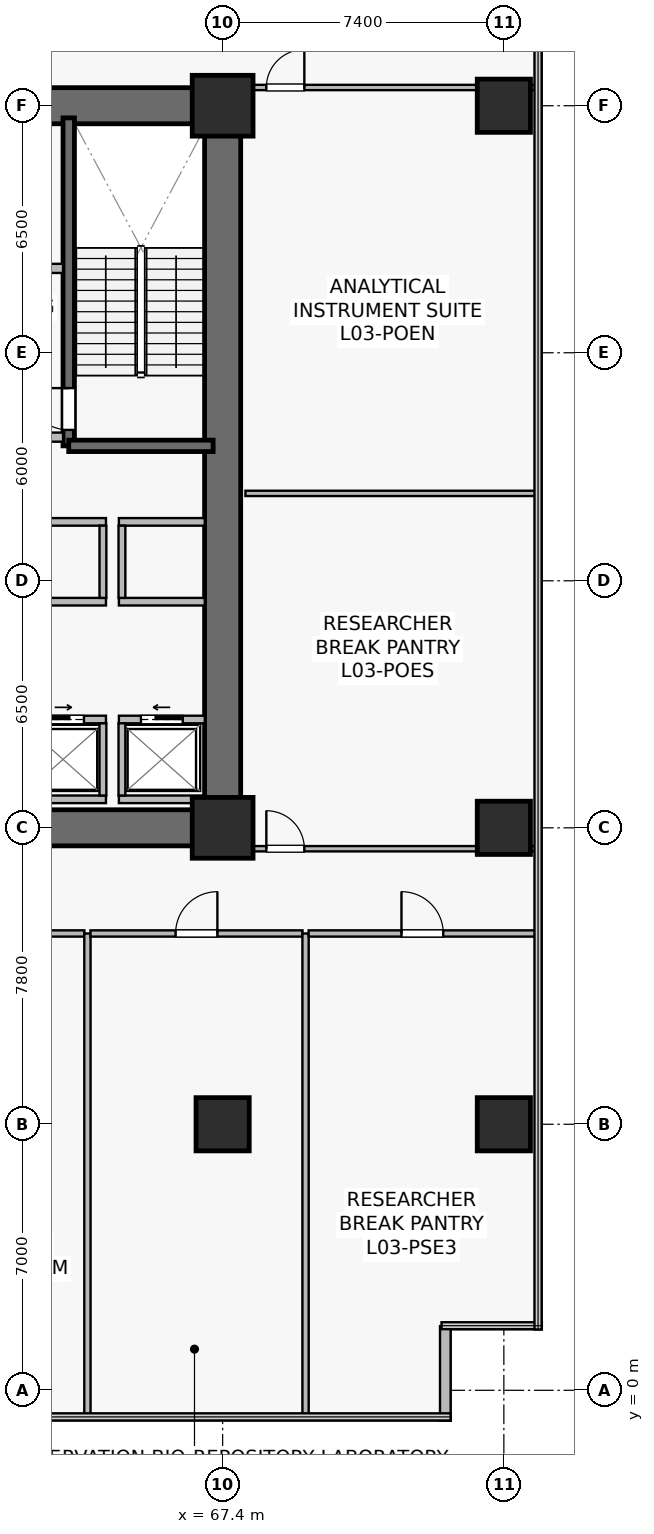
"""IFC4 building model, lengths in metres.
Left out: names, types, materials, properties, quantities, classifications, styles, units other than length and angle.
Written with IfcOpenShell. Run it as: python <this file> out.ifc"""

import sys

from ifc_helpers import new_model, si_unit, direction, frame, frame_2d, origin, origin_2d, place, context, subcontext, project, spatial, rectangle, extrude, source, transform, mapped, element, fill, save


model = new_model("IFC4")
c1 = context("Model", 3, precision=1e-05, world=origin(), true_north=direction((0.0, 1.0)))
c2 = subcontext(c1, "Body", "Model", "MODEL_VIEW")
j1 = project(units=[si_unit("LENGTHUNIT", "METRE"), si_unit("PLANEANGLEUNIT", "RADIAN")], contexts=[c1])
p1 = place(None, origin())
s1 = spatial("IfcSite", under=j1, at=p1, CompositionType="ELEMENT")
p2 = place(p1, origin())
s2 = spatial("IfcBuilding", under=s1, at=p2, CompositionType="ELEMENT")
p3 = place(p2, frame((0.0, 0.0, 10.2)))
s3 = spatial("IfcBuildingStorey", under=s2, at=p3, CompositionType="ELEMENT", Elevation=10.2)
p4 = place(p3, frame((52.125, 14.8, 0.0), z_axis=(0.0, 0.0, 1.0), x_axis=(1.0, 0.0, 0.0)))
e1 = element("IfcWall", 1, at=p4, inside=s3, PredefinedType="SHEAR", context=c2, shape_type="SweptSolid", body=[
    extrude(rectangle(XDim=15.75, YDim=0.95, at=frame_2d((7.875, 0.0))), origin(), (0.0, 0.0, 1.0), 4.45),
])
p5 = place(p3, frame((52.125, 33.8, 0.0), z_axis=(0.0, 0.0, 1.0), x_axis=(1.0, 0.0, 0.0)))
e2 = element("IfcWall", 2, at=p5, inside=s3, PredefinedType="SHEAR", context=c2, shape_type="SweptSolid", body=[
    extrude(rectangle(XDim=15.75, YDim=0.95, at=frame_2d((7.875, 0.0))), origin(), (0.0, 0.0, 1.0), 4.45),
])
p6 = place(p5, frame((8.975, 0.0, 0.0)))
e3 = element("IfcOpeningElement", 3, at=p6, cuts=e2, PredefinedType="OPENING", context=c2, shape_type="SweptSolid", body=[
    extrude(rectangle(XDim=0.95, YDim=2.15, at=frame_2d((0.475, 1.075))), frame((0.0, 0.485, 0.0), z_axis=(0.0, -1.0, 0.0), x_axis=(1.0, 0.0, 0.0)), (0.0, 0.0, 1.0), 0.97),
])
p7 = place(p5, frame((5.61, 0.0, 0.0)))
e4 = element("IfcOpeningElement", 4, at=p7, cuts=e2, PredefinedType="OPENING", context=c2, shape_type="SweptSolid", body=[
    extrude(rectangle(XDim=0.95, YDim=2.15, at=frame_2d((0.475, 1.075))), frame((0.0, 0.485, 0.0), z_axis=(0.0, -1.0, 0.0), x_axis=(1.0, 0.0, 0.0)), (0.0, 0.0, 1.0), 0.97),
])
p8 = place(p5, frame((2.21, 0.0, 0.0)))
e5 = element("IfcOpeningElement", 5, at=p8, cuts=e2, PredefinedType="OPENING", context=c2, shape_type="SweptSolid", body=[
    extrude(rectangle(XDim=0.95, YDim=2.15, at=frame_2d((0.475, 1.075))), frame((0.0, 0.485, 0.0), z_axis=(0.0, -1.0, 0.0), x_axis=(1.0, 0.0, 0.0)), (0.0, 0.0, 1.0), 0.97),
])
p9 = place(p3, frame((67.4, 15.275, 0.0), z_axis=(0.0, 0.0, 1.0), x_axis=(0.0, 1.0, 0.0)))
e6 = element("IfcWall", 6, at=p9, inside=s3, PredefinedType="SHEAR", context=c2, shape_type="SweptSolid", body=[
    extrude(rectangle(XDim=18.05, YDim=0.95, at=frame_2d((9.025, 0.0))), origin(), (0.0, 0.0, 1.0), 4.45),
])
p10 = place(p3, frame((63.35, 24.85, 0.0), z_axis=(0.0, 0.0, 1.0), x_axis=(0.0, 1.0, 0.0)))
e7 = element("IfcWall", 7, at=p10, inside=s3, PredefinedType="SHEAR", context=c2, shape_type="SweptSolid", body=[
    extrude(rectangle(XDim=8.63, YDim=0.3, at=frame_2d((4.315, 0.0))), origin(), (0.0, 0.0, 1.0), 4.45),
])
p11 = place(p10, frame((0.42, 0.0, 0.0)))
e8 = element("IfcOpeningElement", 8, at=p11, cuts=e7, PredefinedType="OPENING", context=c2, shape_type="SweptSolid", body=[
    extrude(rectangle(XDim=1.1, YDim=2.15, at=frame_2d((0.55, 1.075))), frame((0.0, 0.16, 0.0), z_axis=(0.0, -1.0, 0.0), x_axis=(1.0, 0.0, 0.0)), (0.0, 0.0, 1.0), 0.32),
])
p12 = place(p3, frame((63.35, 24.85, 0.0), z_axis=(0.0, 0.0, 1.0), x_axis=(1.0, 0.0, 0.0)))
e9 = element("IfcWall", 9, at=p12, inside=s3, PredefinedType="SHEAR", context=c2, shape_type="SweptSolid", body=[
    extrude(rectangle(XDim=3.8, YDim=0.3, at=frame_2d((1.9, 0.0))), origin(), (0.0, 0.0, 1.0), 4.45),
])
m1 = source(origin(), c2, "Body", "SweptSolid", [
    extrude(rectangle(XDim=1.6, YDim=1.6, at=origin_2d()), origin(), (0.0, 0.0, 1.0), 4.8),
])
for number, where, z_axis, x_axis in (
    (10, (67.4, 14.8, 0.0), (0.0, 0.0, 1.0), (1.0, 0.0, 0.0)),
    (11, (67.4, 33.8, 0.0), (0.0, 0.0, 1.0), (1.0, 0.0, 0.0)),
):
    element("IfcColumn", number, at=place(p3, frame(where, z_axis=z_axis, x_axis=x_axis)), inside=s3, PredefinedType="COLUMN", context=c2, shape_type="MappedRepresentation", body=[
        mapped(m1, transform((0.0, 0.0, 0.0), scale=1.0)),
    ])
m2 = source(origin(), c2, "Body", "SweptSolid", [
    extrude(rectangle(XDim=1.4, YDim=1.4, at=origin_2d()), origin(), (0.0, 0.0, 1.0), 4.8),
])
for number, where, z_axis, x_axis in (
    (12, (67.4, 7.0, 0.0), (0.0, 0.0, 1.0), (1.0, 0.0, 0.0)),
    (13, (74.8, 7.0, 0.0), (0.0, 0.0, 1.0), (1.0, 0.0, 0.0)),
    (14, (74.8, 14.8, 0.0), (0.0, 0.0, 1.0), (1.0, 0.0, 0.0)),
    (15, (74.8, 33.8, 0.0), (0.0, 0.0, 1.0), (1.0, 0.0, 0.0)),
):
    element("IfcColumn", number, at=place(p3, frame(where, z_axis=z_axis, x_axis=x_axis)), inside=s3, PredefinedType="COLUMN", context=c2, shape_type="MappedRepresentation", body=[
        mapped(m2, transform((0.0, 0.0, 0.0), scale=1.0)),
    ])
p13 = place(p3, frame((73.26, -0.8, 0.0), z_axis=(0.0, 0.0, 1.0), x_axis=(0.0, 1.0, 0.0)))
e16 = element("IfcWall", 16, at=p13, inside=s3, PredefinedType="STANDARD", context=c2, shape_type="SweptSolid", body=[
    extrude(rectangle(XDim=2.488, YDim=0.28, at=frame_2d((1.244, 0.0))), origin(), (0.0, 0.0, 1.0), 4.45),
])
p14 = place(p3, frame((56.28, 25.08, 0.0), z_axis=(0.0, 0.0, 1.0), x_axis=(1.0, 0.0, 0.0)))
e17 = element("IfcWall", 17, at=p14, inside=s3, PredefinedType="SOLIDWALL", context=c2, shape_type="SweptSolid", body=[
    extrude(rectangle(XDim=6.92, YDim=0.24, at=frame_2d((3.46, 0.0))), origin(), (0.0, 0.0, 1.0), 3.735),
])
p15 = place(p14, frame((2.6, 0.0, 0.0)))
e18 = element("IfcOpeningElement", 18, at=p15, cuts=e17, PredefinedType="OPENING", context=c2, shape_type="SweptSolid", body=[
    extrude(rectangle(XDim=1.2, YDim=2.16, at=frame_2d((0.6, 1.08))), frame((0.0, 0.13, 0.0), z_axis=(0.0, -1.0, 0.0), x_axis=(1.0, 0.0, 0.0)), (0.0, 0.0, 1.0), 0.26),
])
p16 = place(p3, frame((56.28, 29.52, 0.0), z_axis=(0.0, 0.0, 1.0), x_axis=(1.0, 0.0, 0.0)))
e19 = element("IfcWall", 19, at=p16, inside=s3, PredefinedType="SOLIDWALL", context=c2, shape_type="SweptSolid", body=[
    extrude(rectangle(XDim=6.92, YDim=0.24, at=frame_2d((3.46, 0.0))), origin(), (0.0, 0.0, 1.0), 3.735),
])
p17 = place(p3, frame((64.67, 17.65, 0.0), z_axis=(0.0, 0.0, 1.0), x_axis=(1.0, 0.0, 0.0)))
e20 = element("IfcWall", 20, at=p17, inside=s3, PredefinedType="SOLIDWALL", context=c2, shape_type="SweptSolid", body=[
    extrude(rectangle(XDim=2.26, YDim=0.2, at=frame_2d((1.13, 0.0))), origin(), (0.0, 0.0, 1.0), 4.45),
])
p18 = place(p17, frame((0.58, 0.0, 0.0)))
e21 = element("IfcOpeningElement", 21, at=p18, cuts=e20, PredefinedType="OPENING", context=c2, shape_type="SweptSolid", body=[
    extrude(rectangle(XDim=1.1, YDim=2.22, at=frame_2d((0.55, 1.11))), frame((0.0, 0.11, 0.0), z_axis=(0.0, -1.0, 0.0), x_axis=(1.0, 0.0, 0.0)), (0.0, 0.0, 1.0), 0.22),
])
p19 = place(p3, frame((64.67, 15.55, 0.0), z_axis=(0.0, 0.0, 1.0), x_axis=(1.0, 0.0, 0.0)))
e22 = element("IfcWall", 22, at=p19, inside=s3, PredefinedType="SOLIDWALL", context=c2, shape_type="SweptSolid", body=[
    extrude(rectangle(XDim=2.26, YDim=0.2, at=frame_2d((1.13, 0.0))), origin(), (0.0, 0.0, 1.0), 4.45),
])
p20 = place(p3, frame((64.75, 15.65, 0.0), z_axis=(0.0, 0.0, 1.0), x_axis=(0.0, 1.0, 0.0)))
e23 = element("IfcWall", 23, at=p20, inside=s3, PredefinedType="SOLIDWALL", context=c2, shape_type="SweptSolid", body=[
    extrude(rectangle(XDim=1.9, YDim=0.18, at=frame_2d((0.95, 0.0))), origin(), (0.0, 0.0, 1.0), 4.45),
])
p21 = place(p3, frame((62.07, 17.65, 0.0), z_axis=(0.0, 0.0, 1.0), x_axis=(1.0, 0.0, 0.0)))
e24 = element("IfcWall", 24, at=p21, inside=s3, PredefinedType="SOLIDWALL", context=c2, shape_type="SweptSolid", body=[
    extrude(rectangle(XDim=2.26, YDim=0.2, at=frame_2d((1.13, 0.0))), origin(), (0.0, 0.0, 1.0), 4.45),
])
p22 = place(p21, frame((0.58, 0.0, 0.0)))
e25 = element("IfcOpeningElement", 25, at=p22, cuts=e24, PredefinedType="OPENING", context=c2, shape_type="SweptSolid", body=[
    extrude(rectangle(XDim=1.1, YDim=2.22, at=frame_2d((0.55, 1.11))), frame((0.0, 0.11, 0.0), z_axis=(0.0, -1.0, 0.0), x_axis=(1.0, 0.0, 0.0)), (0.0, 0.0, 1.0), 0.22),
])
p23 = place(p3, frame((62.07, 15.55, 0.0), z_axis=(0.0, 0.0, 1.0), x_axis=(1.0, 0.0, 0.0)))
e26 = element("IfcWall", 26, at=p23, inside=s3, PredefinedType="SOLIDWALL", context=c2, shape_type="SweptSolid", body=[
    extrude(rectangle(XDim=2.26, YDim=0.2, at=frame_2d((1.13, 0.0))), origin(), (0.0, 0.0, 1.0), 4.45),
])
p24 = place(p3, frame((64.25, 15.65, 0.0), z_axis=(0.0, 0.0, 1.0), x_axis=(0.0, 1.0, 0.0)))
e27 = element("IfcWall", 27, at=p24, inside=s3, PredefinedType="SOLIDWALL", context=c2, shape_type="SweptSolid", body=[
    extrude(rectangle(XDim=1.9, YDim=0.18, at=frame_2d((0.95, 0.0))), origin(), (0.0, 0.0, 1.0), 4.45),
])
for number, where, z_axis, x_axis in (
    (28, (64.67, 20.75, 0.0), (0.0, 0.0, 1.0), (1.0, 0.0, 0.0)),
    (29, (64.67, 22.85, 0.0), (0.0, 0.0, 1.0), (1.0, 0.0, 0.0)),
):
    element("IfcWall", number, at=place(p3, frame(where, z_axis=z_axis, x_axis=x_axis)), inside=s3, PredefinedType="SOLIDWALL", context=c2, shape_type="SweptSolid", body=[
        extrude(rectangle(XDim=2.26, YDim=0.2, at=frame_2d((1.13, 0.0))), origin(), (0.0, 0.0, 1.0), 4.45),
    ])
p25 = place(p3, frame((64.75, 20.85, 0.0), z_axis=(0.0, 0.0, 1.0), x_axis=(0.0, 1.0, 0.0)))
e30 = element("IfcWall", 30, at=p25, inside=s3, PredefinedType="SOLIDWALL", context=c2, shape_type="SweptSolid", body=[
    extrude(rectangle(XDim=1.9, YDim=0.18, at=frame_2d((0.95, 0.0))), origin(), (0.0, 0.0, 1.0), 4.45),
])
for number, where, z_axis, x_axis in (
    (31, (62.07, 20.75, 0.0), (0.0, 0.0, 1.0), (1.0, 0.0, 0.0)),
    (32, (62.07, 22.85, 0.0), (0.0, 0.0, 1.0), (1.0, 0.0, 0.0)),
):
    element("IfcWall", number, at=place(p3, frame(where, z_axis=z_axis, x_axis=x_axis)), inside=s3, PredefinedType="SOLIDWALL", context=c2, shape_type="SweptSolid", body=[
        extrude(rectangle(XDim=2.26, YDim=0.2, at=frame_2d((1.13, 0.0))), origin(), (0.0, 0.0, 1.0), 4.45),
    ])
p26 = place(p3, frame((64.25, 20.85, 0.0), z_axis=(0.0, 0.0, 1.0), x_axis=(0.0, 1.0, 0.0)))
e33 = element("IfcWall", 33, at=p26, inside=s3, PredefinedType="SOLIDWALL", context=c2, shape_type="SweptSolid", body=[
    extrude(rectangle(XDim=1.9, YDim=0.18, at=frame_2d((0.95, 0.0))), origin(), (0.0, 0.0, 1.0), 4.45),
])
p27 = place(p3, frame((68.0, 23.6, 0.0), z_axis=(0.0, 0.0, 1.0), x_axis=(1.0, 0.0, 0.0)))
e34 = element("IfcWall", 34, at=p27, inside=s3, PredefinedType="PARTITIONING", context=c2, shape_type="SweptSolid", body=[
    extrude(rectangle(XDim=7.65, YDim=0.14, at=frame_2d((3.825, 0.0))), origin(), (0.0, 0.0, 1.0), 3.835),
])
p28 = place(p3, frame((68.0, 14.25, 0.0), z_axis=(0.0, 0.0, 1.0), x_axis=(1.0, 0.0, 0.0)))
e35 = element("IfcWall", 35, at=p28, inside=s3, PredefinedType="PARTITIONING", context=c2, shape_type="SweptSolid", body=[
    extrude(rectangle(XDim=7.65, YDim=0.14, at=frame_2d((3.825, 0.0))), origin(), (0.0, 0.0, 1.0), 3.835),
])
p29 = place(p28, frame((0.55, 0.0, 0.0)))
e36 = element("IfcOpeningElement", 36, at=p29, cuts=e35, PredefinedType="OPENING", context=c2, shape_type="SweptSolid", body=[
    extrude(rectangle(XDim=1.0, YDim=2.15, at=frame_2d((0.5, 1.075))), frame((0.0, 0.08, 0.0), z_axis=(0.0, -1.0, 0.0), x_axis=(1.0, 0.0, 0.0)), (0.0, 0.0, 1.0), 0.16),
])
p30 = place(p3, frame((68.0, 34.28, 0.0), z_axis=(0.0, 0.0, 1.0), x_axis=(1.0, 0.0, 0.0)))
e37 = element("IfcWall", 37, at=p30, inside=s3, PredefinedType="PARTITIONING", context=c2, shape_type="SweptSolid", body=[
    extrude(rectangle(XDim=7.65, YDim=0.14, at=frame_2d((3.825, 0.0))), origin(), (0.0, 0.0, 1.0), 3.835),
])
p31 = place(p30, frame((0.55, 0.0, 0.0)))
e38 = element("IfcOpeningElement", 38, at=p31, cuts=e37, PredefinedType="OPENING", context=c2, shape_type="SweptSolid", body=[
    extrude(rectangle(XDim=1.0, YDim=2.15, at=frame_2d((0.5, 1.075))), frame((0.0, 0.08, 0.0), z_axis=(0.0, -1.0, 0.0), x_axis=(1.0, 0.0, 0.0)), (0.0, 0.0, 1.0), 0.16),
])
p32 = place(p3, frame((59.25, 12.02, 0.0), z_axis=(0.0, 0.0, 1.0), x_axis=(1.0, 0.0, 0.0)))
e39 = element("IfcWall", 39, at=p32, inside=s3, PredefinedType="PARTITIONING", context=c2, shape_type="SweptSolid", body=[
    extrude(rectangle(XDim=4.512, YDim=0.165, at=frame_2d((2.256, 0.0))), origin(), (0.0, 0.0, 1.0), 3.735),
])
p33 = place(p32, frame((1.706, 0.0, 0.0)))
e40 = element("IfcOpeningElement", 40, at=p33, cuts=e39, PredefinedType="OPENING", context=c2, shape_type="SweptSolid", body=[
    extrude(rectangle(XDim=1.1, YDim=2.18, at=frame_2d((0.55, 1.09))), frame((0.0, 0.093, 0.0), z_axis=(0.0, -1.0, 0.0), x_axis=(1.0, 0.0, 0.0)), (0.0, 0.0, 1.0), 0.185),
])
p34 = place(p3, frame((63.842, -0.69, 0.0), z_axis=(0.0, 0.0, 1.0), x_axis=(0.0, 1.0, 0.0)))
e41 = element("IfcWall", 41, at=p34, inside=s3, PredefinedType="PARTITIONING", context=c2, shape_type="SweptSolid", body=[
    extrude(rectangle(XDim=12.71, YDim=0.165, at=frame_2d((6.355, 0.0))), origin(), (0.0, 0.0, 1.0), 3.635),
])
p35 = place(p3, frame((63.922, 12.02, 0.0), z_axis=(0.0, 0.0, 1.0), x_axis=(1.0, 0.0, 0.0)))
e42 = element("IfcWall", 42, at=p35, inside=s3, PredefinedType="PARTITIONING", context=c2, shape_type="SweptSolid", body=[
    extrude(rectangle(XDim=5.58, YDim=0.165, at=frame_2d((2.79, 0.0))), origin(), (0.0, 0.0, 1.0), 3.735),
])
p36 = place(p35, frame((2.24, 0.0, 0.0)))
e43 = element("IfcOpeningElement", 43, at=p36, cuts=e42, PredefinedType="OPENING", context=c2, shape_type="SweptSolid", body=[
    extrude(rectangle(XDim=1.1, YDim=2.18, at=frame_2d((0.55, 1.09))), frame((0.0, 0.093, 0.0), z_axis=(0.0, -1.0, 0.0), x_axis=(1.0, 0.0, 0.0)), (0.0, 0.0, 1.0), 0.185),
])
p37 = place(p3, frame((69.582, -0.69, 0.0), z_axis=(0.0, 0.0, 1.0), x_axis=(0.0, 1.0, 0.0)))
e44 = element("IfcWall", 44, at=p37, inside=s3, PredefinedType="PARTITIONING", context=c2, shape_type="SweptSolid", body=[
    extrude(rectangle(XDim=12.71, YDim=0.165, at=frame_2d((6.355, 0.0))), origin(), (0.0, 0.0, 1.0), 3.635),
])
p38 = place(p3, frame((69.662, 12.02, 0.0), z_axis=(0.0, 0.0, 1.0), x_axis=(1.0, 0.0, 0.0)))
e45 = element("IfcWall", 45, at=p38, inside=s3, PredefinedType="PARTITIONING", context=c2, shape_type="SweptSolid", body=[
    extrude(rectangle(XDim=5.988, YDim=0.165, at=frame_2d((2.994, 0.0))), origin(), (0.0, 0.0, 1.0), 3.835),
])
p39 = place(p38, frame((2.444, 0.0, 0.0)))
e46 = element("IfcOpeningElement", 46, at=p39, cuts=e45, PredefinedType="OPENING", context=c2, shape_type="SweptSolid", body=[
    extrude(rectangle(XDim=1.1, YDim=2.18, at=frame_2d((0.55, 1.09))), frame((0.0, 0.093, 0.0), z_axis=(0.0, -1.0, 0.0), x_axis=(1.0, 0.0, 0.0)), (0.0, 0.0, 1.0), 0.185),
])
m3 = source(origin(), c2, "Body", "SweptSolid", [
    extrude(rectangle(XDim=1.1, YDim=2.15, at=frame_2d((0.55, 1.075))), frame((0.0, 0.025, 0.0), z_axis=(0.0, -1.0, 0.0), x_axis=(1.0, 0.0, 0.0)), (0.0, 0.0, 1.0), 0.05),
])
p40 = place(p11, origin())
e47 = element("IfcDoor", 47, at=p40, inside=s3, OperationType="SINGLE_SWING_RIGHT", PredefinedType="DOOR", context=c2, shape_type="MappedRepresentation", body=[
    mapped(m3, transform((0.0, 0.0, 0.0), scale=1.0)),
])
fill(e8, e47)
m4 = source(origin(), c2, "Body", "SweptSolid", [
    extrude(rectangle(XDim=1.1, YDim=2.22, at=frame_2d((0.55, 1.11))), frame((0.0, 0.025, 0.0), z_axis=(0.0, -1.0, 0.0), x_axis=(1.0, 0.0, 0.0)), (0.0, 0.0, 1.0), 0.05),
])
p41 = place(p18, origin())
e48 = element("IfcDoor", 48, at=p41, inside=s3, OperationType="SLIDING_TO_LEFT", PredefinedType="USERDEFINED", context=c2, shape_type="MappedRepresentation", body=[
    mapped(m4, transform((0.0, 0.0, 0.0), scale=1.0)),
])
fill(e21, e48)
p42 = place(p22, origin())
e49 = element("IfcDoor", 49, at=p42, inside=s3, OperationType="SLIDING_TO_RIGHT", PredefinedType="USERDEFINED", context=c2, shape_type="MappedRepresentation", body=[
    mapped(m4, transform((0.0, 0.0, 0.0), scale=1.0)),
])
fill(e25, e49)
m5 = source(origin(), c2, "Body", "SweptSolid", [
    extrude(rectangle(XDim=1.0, YDim=2.15, at=frame_2d((0.5, 1.075))), frame((0.0, 0.025, 0.0), z_axis=(0.0, -1.0, 0.0), x_axis=(1.0, 0.0, 0.0)), (0.0, 0.0, 1.0), 0.05),
])
p43 = place(p29, origin())
e50 = element("IfcDoor", 50, at=p43, inside=s3, OperationType="SINGLE_SWING_LEFT", PredefinedType="DOOR", context=c2, shape_type="MappedRepresentation", body=[
    mapped(m5, transform((0.0, 0.0, 0.0), scale=1.0)),
])
fill(e36, e50)
p44 = place(p31, origin())
e51 = element("IfcDoor", 51, at=p44, inside=s3, OperationType="SINGLE_SWING_RIGHT", PredefinedType="DOOR", context=c2, shape_type="MappedRepresentation", body=[
    mapped(m5, transform((0.0, 0.0, 0.0), scale=1.0)),
])
fill(e38, e51)
m6 = source(origin(), c2, "Body", "SweptSolid", [
    extrude(rectangle(XDim=1.1, YDim=2.18, at=frame_2d((0.55, 1.09))), frame((0.0, 0.025, 0.0), z_axis=(0.0, -1.0, 0.0), x_axis=(1.0, 0.0, 0.0)), (0.0, 0.0, 1.0), 0.05),
])
p45 = place(p36, origin())
e52 = element("IfcDoor", 52, at=p45, inside=s3, OperationType="SINGLE_SWING_RIGHT", PredefinedType="DOOR", context=c2, shape_type="MappedRepresentation", body=[
    mapped(m6, transform((0.0, 0.0, 0.0), scale=1.0)),
])
fill(e43, e52)
p46 = place(p39, origin())
e53 = element("IfcDoor", 53, at=p46, inside=s3, OperationType="SINGLE_SWING_LEFT", PredefinedType="DOOR", context=c2, shape_type="MappedRepresentation", body=[
    mapped(m6, transform((0.0, 0.0, 0.0), scale=1.0)),
])
fill(e46, e53)
save(model, sys.argv[1])
